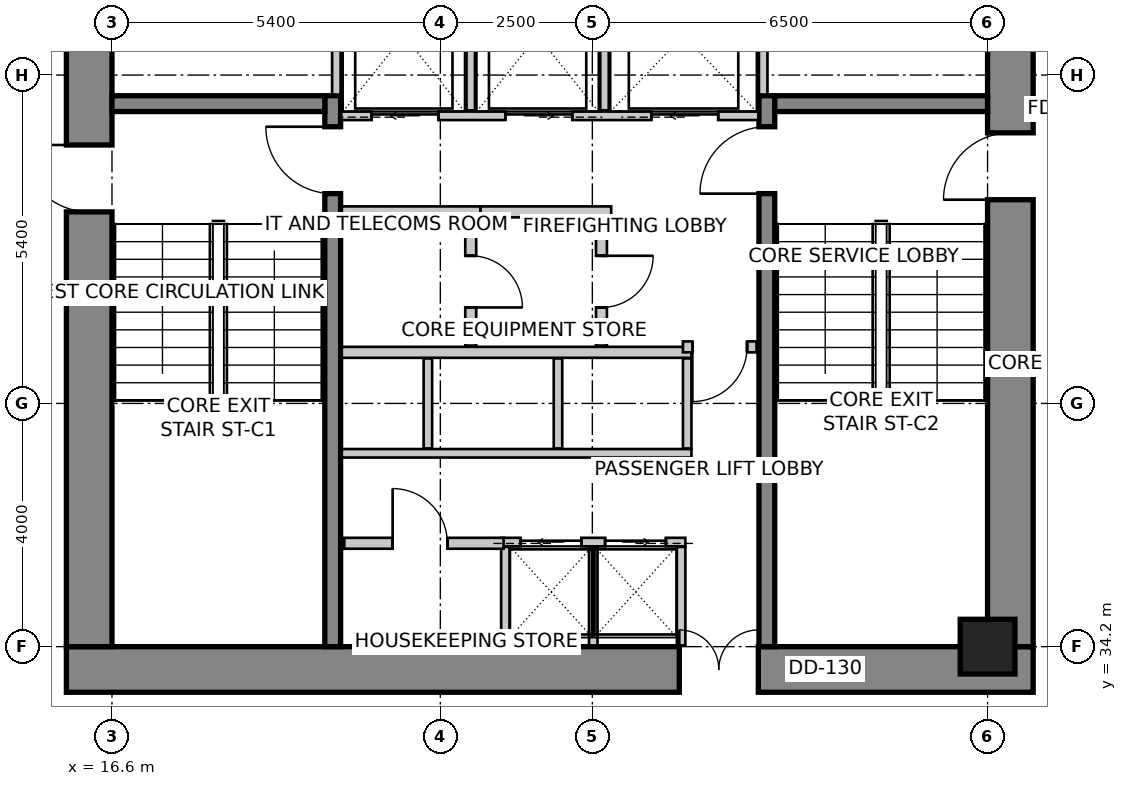
"""IFC4 building model, lengths in metres.
Left out: names, types, materials, properties, quantities, classifications, styles, units other than length and angle.
Written with IfcOpenShell. Run it as: python <this file> out.ifc"""

import sys

from ifc_helpers import new_model, si_unit, direction, frame, frame_2d, origin, origin_2d, place, context, subcontext, project, spatial, rectangle, extrude, source, transform, mapped, element, fill, save


model = new_model("IFC4")
c1 = context("Model", 3, precision=1e-05, world=origin(), true_north=direction((0.0, 1.0)))
c2 = subcontext(c1, "Body", "Model", "MODEL_VIEW")
j1 = project(units=[si_unit("LENGTHUNIT", "METRE"), si_unit("PLANEANGLEUNIT", "RADIAN")], contexts=[c1])
p1 = place(None, origin())
s1 = spatial("IfcSite", under=j1, at=p1, CompositionType="ELEMENT")
p2 = place(p1, origin())
s2 = spatial("IfcBuilding", under=s1, at=p2, CompositionType="ELEMENT")
p3 = place(p2, frame((0.0, 0.0, 146.6)))
s3 = spatial("IfcBuildingStorey", under=s2, at=p3, CompositionType="ELEMENT", Elevation=146.6)
p4 = place(p3, frame((15.85, 33.825, 0.0), z_axis=(0.0, 0.0, 1.0), x_axis=(1.0, 0.0, 0.0)))
e1 = element("IfcWall", 1, at=p4, inside=s3, PredefinedType="SHEAR", context=c2, shape_type="SweptSolid", body=[
    extrude(rectangle(XDim=15.9, YDim=0.75, at=frame_2d((7.95, 0.0))), origin(), (0.0, 0.0, 1.0), 3.6),
])
m1 = source(origin(), c2, "Body", "SweptSolid", [
    extrude(rectangle(XDim=1.3, YDim=2.15, at=frame_2d((0.65, 1.075))), frame((0.0, 0.385, 0.0), z_axis=(0.0, -1.0, 0.0), x_axis=(1.0, 0.0, 0.0)), (0.0, 0.0, 1.0), 0.77),
])
p5 = place(p4, frame((10.08, 0.0, 0.0)))
e2 = element("IfcOpeningElement", 2, at=p5, cuts=e1, PredefinedType="OPENING", context=c2, shape_type="MappedRepresentation", body=[
    mapped(m1, transform((0.0, 0.0, 0.0), scale=1.0)),
])
p6 = place(p3, frame((16.225, 34.2, 0.0), z_axis=(0.0, 0.0, 1.0), x_axis=(0.0, 1.0, 0.0)))
e3 = element("IfcWall", 3, at=p6, inside=s3, PredefinedType="SHEAR", context=c2, shape_type="SweptSolid", body=[
    extrude(rectangle(XDim=11.4, YDim=0.75, at=frame_2d((5.7, 0.0))), origin(), (0.0, 0.0, 1.0), 3.6),
])
m2 = source(origin(), c2, "Body", "SweptSolid", [
    extrude(rectangle(XDim=1.1, YDim=2.15, at=frame_2d((0.55, 1.075))), frame((0.0, 0.385, 0.0), z_axis=(0.0, -1.0, 0.0), x_axis=(1.0, 0.0, 0.0)), (0.0, 0.0, 1.0), 0.77),
])
p7 = place(p6, frame((7.15, 0.0, 0.0)))
e4 = element("IfcOpeningElement", 4, at=p7, cuts=e3, PredefinedType="OPENING", context=c2, shape_type="MappedRepresentation", body=[
    mapped(m2, transform((0.0, 0.0, 0.0), scale=1.0)),
])
p8 = place(p3, frame((31.375, 34.2, 0.0), z_axis=(0.0, 0.0, 1.0), x_axis=(0.0, 1.0, 0.0)))
e5 = element("IfcWall", 5, at=p8, inside=s3, PredefinedType="SHEAR", context=c2, shape_type="SweptSolid", body=[
    extrude(rectangle(XDim=11.4, YDim=0.75, at=frame_2d((5.7, 0.0))), origin(), (0.0, 0.0, 1.0), 3.6),
])
p9 = place(p8, frame((7.35, 0.0, 0.0)))
e6 = element("IfcOpeningElement", 6, at=p9, cuts=e5, PredefinedType="OPENING", context=c2, shape_type="MappedRepresentation", body=[
    mapped(m2, transform((0.0, 0.0, 0.0), scale=1.0)),
])
p10 = place(p3, frame((20.23, 34.2, 0.0), z_axis=(0.0, 0.0, 1.0), x_axis=(0.0, 1.0, 0.0)))
e7 = element("IfcWall", 7, at=p10, inside=s3, PredefinedType="SHEAR", context=c2, shape_type="SweptSolid", body=[
    extrude(rectangle(XDim=9.06, YDim=0.26, at=frame_2d((4.53, 0.0))), origin(), (0.0, 0.0, 1.0), 3.6),
])
m3 = source(origin(), c2, "Body", "SweptSolid", [
    extrude(rectangle(XDim=1.1, YDim=2.15, at=frame_2d((0.55, 1.075))), frame((0.0, 0.14, 0.0), z_axis=(0.0, -1.0, 0.0), x_axis=(1.0, 0.0, 0.0)), (0.0, 0.0, 1.0), 0.28),
])
p11 = place(p10, frame((7.45, 0.0, 0.0)))
e8 = element("IfcOpeningElement", 8, at=p11, cuts=e7, PredefinedType="OPENING", context=c2, shape_type="MappedRepresentation", body=[
    mapped(m3, transform((0.0, 0.0, 0.0), scale=1.0)),
])
p12 = place(p3, frame((27.37, 34.2, 0.0), z_axis=(0.0, 0.0, 1.0), x_axis=(0.0, 1.0, 0.0)))
e9 = element("IfcWall", 9, at=p12, inside=s3, PredefinedType="SHEAR", context=c2, shape_type="SweptSolid", body=[
    extrude(rectangle(XDim=9.06, YDim=0.26, at=frame_2d((4.53, 0.0))), origin(), (0.0, 0.0, 1.0), 3.6),
])
p13 = place(p12, frame((7.45, 0.0, 0.0)))
e10 = element("IfcOpeningElement", 10, at=p13, cuts=e9, PredefinedType="OPENING", context=c2, shape_type="MappedRepresentation", body=[
    mapped(m3, transform((0.0, 0.0, 0.0), scale=1.0)),
])
for number, where, z_axis, x_axis in (
    (11, (16.6, 43.13, 0.0), (0.0, 0.0, 1.0), (1.0, 0.0, 0.0)),
    (12, (27.5, 43.13, 0.0), (0.0, 0.0, 1.0), (1.0, 0.0, 0.0)),
):
    element("IfcWall", number, at=place(p3, frame(where, z_axis=z_axis, x_axis=x_axis)), inside=s3, PredefinedType="SHEAR", context=c2, shape_type="SweptSolid", body=[
        extrude(rectangle(XDim=3.5, YDim=0.26, at=frame_2d((1.75, 0.0))), origin(), (0.0, 0.0, 1.0), 3.6),
    ])
m4 = source(origin(), c2, "Body", "SweptSolid", [
    extrude(rectangle(XDim=0.9, YDim=0.9, at=origin_2d()), origin(), (0.0, 0.0, 1.0), 3.6),
])
p14 = place(p3, frame((31.0, 34.2, 0.0), z_axis=(0.0, 0.0, 1.0), x_axis=(1.0, 0.0, 0.0)))
e13 = element("IfcColumn", 13, at=p14, inside=s3, PredefinedType="COLUMN", context=c2, shape_type="MappedRepresentation", body=[
    mapped(m4, transform((0.0, 0.0, 0.0), scale=1.0)),
])
p15 = place(p3, frame((20.37, 42.93, 0.0), z_axis=(0.0, 0.0, 1.0), x_axis=(1.0, 0.0, 0.0)))
e14 = element("IfcWall", 14, at=p15, inside=s3, PredefinedType="SOLIDWALL", context=c2, shape_type="SweptSolid", body=[
    extrude(rectangle(XDim=6.86, YDim=0.14, at=frame_2d((3.43, 0.0))), origin(), (0.0, 0.0, 1.0), 3.35),
])
m5 = source(origin(), c2, "Body", "SweptSolid", [
    extrude(rectangle(XDim=1.1, YDim=2.15, at=frame_2d((0.55, 1.075))), frame((0.0, 0.08, 0.0), z_axis=(0.0, -1.0, 0.0), x_axis=(1.0, 0.0, 0.0)), (0.0, 0.0, 1.0), 0.16),
])
p16 = place(p15, frame((0.5, 0.0, 0.0)))
e15 = element("IfcOpeningElement", 15, at=p16, cuts=e14, PredefinedType="OPENING", context=c2, shape_type="MappedRepresentation", body=[
    mapped(m5, transform((0.0, 0.0, 0.0), scale=1.0)),
])
p17 = place(p15, frame((2.7, 0.0, 0.0)))
e16 = element("IfcOpeningElement", 16, at=p17, cuts=e14, PredefinedType="OPENING", context=c2, shape_type="MappedRepresentation", body=[
    mapped(m5, transform((0.0, 0.0, 0.0), scale=1.0)),
])
p18 = place(p15, frame((5.1, 0.0, 0.0)))
e17 = element("IfcOpeningElement", 17, at=p18, cuts=e14, PredefinedType="OPENING", context=c2, shape_type="MappedRepresentation", body=[
    mapped(m5, transform((0.0, 0.0, 0.0), scale=1.0)),
])
for number, where, z_axis, x_axis in (
    (18, (20.29, 43.28, 0.0), (0.0, 0.0, 1.0), (0.0, 1.0, 0.0)),
    (19, (27.31, 43.28, 0.0), (0.0, 0.0, 1.0), (0.0, 1.0, 0.0)),
):
    element("IfcWall", number, at=place(p3, frame(where, z_axis=z_axis, x_axis=x_axis)), inside=s3, PredefinedType="SOLIDWALL", context=c2, shape_type="SweptSolid", body=[
        extrude(rectangle(XDim=2.3, YDim=0.14, at=frame_2d((1.15, 0.0))), origin(), (0.0, 0.0, 1.0), 3.35),
    ])
for number, where, z_axis, x_axis in (
    (20, (22.5, 43.02, 0.0), (0.0, 0.0, 1.0), (0.0, 1.0, 0.0)),
    (21, (24.7, 43.02, 0.0), (0.0, 0.0, 1.0), (0.0, 1.0, 0.0)),
):
    element("IfcWall", number, at=place(p3, frame(where, z_axis=z_axis, x_axis=x_axis)), inside=s3, PredefinedType="SOLIDWALL", context=c2, shape_type="SweptSolid", body=[
        extrude(rectangle(XDim=2.56, YDim=0.14, at=frame_2d((1.28, 0.0))), origin(), (0.0, 0.0, 1.0), 3.35),
    ])
p19 = place(p3, frame((23.0, 35.92, 0.0), z_axis=(0.0, 0.0, 1.0), x_axis=(1.0, 0.0, 0.0)))
e22 = element("IfcWall", 22, at=p19, inside=s3, PredefinedType="SOLIDWALL", context=c2, shape_type="SweptSolid", body=[
    extrude(rectangle(XDim=3.03, YDim=0.14, at=frame_2d((1.515, 0.0))), origin(), (0.0, 0.0, 1.0), 3.35),
])
m6 = source(origin(), c2, "Body", "SweptSolid", [
    extrude(rectangle(XDim=1.0, YDim=2.15, at=frame_2d((0.5, 1.075))), frame((0.0, 0.08, 0.0), z_axis=(0.0, -1.0, 0.0), x_axis=(1.0, 0.0, 0.0)), (0.0, 0.0, 1.0), 0.16),
])
p20 = place(p19, frame((0.32, 0.0, 0.0)))
e23 = element("IfcOpeningElement", 23, at=p20, cuts=e22, PredefinedType="OPENING", context=c2, shape_type="MappedRepresentation", body=[
    mapped(m6, transform((0.0, 0.0, 0.0), scale=1.0)),
])
p21 = place(p19, frame((1.71, 0.0, 0.0)))
e24 = element("IfcOpeningElement", 24, at=p21, cuts=e22, PredefinedType="OPENING", context=c2, shape_type="MappedRepresentation", body=[
    mapped(m6, transform((0.0, 0.0, 0.0), scale=1.0)),
])
for number, where, z_axis, x_axis in (
    (25, (25.96, 34.22, 0.0), (0.0, 0.0, 1.0), (0.0, 1.0, 0.0)),
    (26, (23.07, 34.22, 0.0), (0.0, 0.0, 1.0), (0.0, 1.0, 0.0)),
    (27, (24.515, 34.22, 0.0), (0.0, 0.0, 1.0), (0.0, 1.0, 0.0)),
):
    element("IfcWall", number, at=place(p3, frame(where, z_axis=z_axis, x_axis=x_axis)), inside=s3, PredefinedType="SOLIDWALL", context=c2, shape_type="SweptSolid", body=[
        extrude(rectangle(XDim=1.62, YDim=0.14, at=frame_2d((0.81, 0.0))), origin(), (0.0, 0.0, 1.0), 2.642),
    ])
p22 = place(p3, frame((20.38, 37.38, 0.0), z_axis=(0.0, 0.0, 1.0), x_axis=(1.0, 0.0, 0.0)))
e28 = element("IfcWall", 28, at=p22, inside=s3, PredefinedType="SOLIDWALL", context=c2, shape_type="SweptSolid", body=[
    extrude(rectangle(XDim=5.75, YDim=0.14, at=frame_2d((2.875, 0.0))), origin(), (0.0, 0.0, 1.0), 3.35),
])
p23 = place(p3, frame((20.38, 39.04, 0.0), z_axis=(0.0, 0.0, 1.0), x_axis=(1.0, 0.0, 0.0)))
e29 = element("IfcWall", 29, at=p23, inside=s3, PredefinedType="SOLIDWALL", context=c2, shape_type="SweptSolid", body=[
    extrude(rectangle(XDim=5.75, YDim=0.18, at=frame_2d((2.875, 0.0))), origin(), (0.0, 0.0, 1.0), 3.35),
])
for number, where, z_axis, x_axis in (
    (30, (26.06, 37.46, 0.0), (0.0, 0.0, 1.0), (0.0, 1.0, 0.0)),
    (31, (21.795, 37.46, 0.0), (0.0, 0.0, 1.0), (0.0, 1.0, 0.0)),
    (32, (23.935, 37.46, 0.0), (0.0, 0.0, 1.0), (0.0, 1.0, 0.0)),
):
    element("IfcWall", number, at=place(p3, frame(where, z_axis=z_axis, x_axis=x_axis)), inside=s3, PredefinedType="SOLIDWALL", context=c2, shape_type="SweptSolid", body=[
        extrude(rectangle(XDim=1.48, YDim=0.14, at=frame_2d((0.74, 0.0))), origin(), (0.0, 0.0, 1.0), 3.35),
    ])
p24 = place(p3, frame((22.66, 41.35, 0.0), z_axis=(0.0, 0.0, 1.0), x_axis=(-1.0, 0.0, 0.0)))
e33 = element("IfcWall", 33, at=p24, inside=s3, PredefinedType="PARTITIONING", context=c2, shape_type="SweptSolid", body=[
    extrude(rectangle(XDim=2.28, YDim=0.18, at=frame_2d((1.14, 0.0))), origin(), (0.0, 0.0, 1.0), 3.35),
])
p25 = place(p3, frame((24.81, 41.35, 0.0), z_axis=(0.0, 0.0, 1.0), x_axis=(-1.0, 0.0, 0.0)))
e34 = element("IfcWall", 34, at=p25, inside=s3, PredefinedType="PARTITIONING", context=c2, shape_type="SweptSolid", body=[
    extrude(rectangle(XDim=2.148, YDim=0.18, at=frame_2d((1.074, 0.0))), origin(), (0.0, 0.0, 1.0), 3.35),
])
p26 = place(p3, frame((22.5, 41.256, 0.0), z_axis=(0.0, 0.0, 1.0), x_axis=(0.0, -1.0, 0.0)))
e35 = element("IfcWall", 35, at=p26, inside=s3, PredefinedType="PARTITIONING", context=c2, shape_type="SweptSolid", body=[
    extrude(rectangle(XDim=2.106, YDim=0.18, at=frame_2d((1.053, 0.0))), origin(), (0.0, 0.0, 1.0), 3.35),
])
m7 = source(origin(), c2, "Body", "SweptSolid", [
    extrude(rectangle(XDim=0.85, YDim=2.15, at=frame_2d((0.425, 1.075))), frame((0.0, 0.1, 0.0), z_axis=(0.0, -1.0, 0.0), x_axis=(1.0, 0.0, 0.0)), (0.0, 0.0, 1.0), 0.2),
])
p27 = place(p26, frame((0.628, 0.0, 0.0)))
e36 = element("IfcOpeningElement", 36, at=p27, cuts=e35, PredefinedType="OPENING", context=c2, shape_type="MappedRepresentation", body=[
    mapped(m7, transform((0.0, 0.0, 0.0), scale=1.0)),
])
p28 = place(p3, frame((24.65, 41.256, 0.0), z_axis=(0.0, 0.0, 1.0), x_axis=(0.0, -1.0, 0.0)))
e37 = element("IfcWall", 37, at=p28, inside=s3, PredefinedType="PARTITIONING", context=c2, shape_type="SweptSolid", body=[
    extrude(rectangle(XDim=2.106, YDim=0.18, at=frame_2d((1.053, 0.0))), origin(), (0.0, 0.0, 1.0), 3.35),
])
p29 = place(p28, frame((0.628, 0.0, 0.0)))
e38 = element("IfcOpeningElement", 38, at=p29, cuts=e37, PredefinedType="OPENING", context=c2, shape_type="MappedRepresentation", body=[
    mapped(m7, transform((0.0, 0.0, 0.0), scale=1.0)),
])
p30 = place(p3, frame((27.2, 39.13, 0.0), z_axis=(0.0, 0.0, 1.0), x_axis=(-1.0, 0.0, 0.0)))
e39 = element("IfcWall", 39, at=p30, inside=s3, PredefinedType="PARTITIONING", context=c2, shape_type="SweptSolid", body=[
    extrude(rectangle(XDim=1.21, YDim=0.18, at=frame_2d((0.605, 0.0))), origin(), (0.0, 0.0, 1.0), 3.35),
])
m8 = source(origin(), c2, "Body", "SweptSolid", [
    extrude(rectangle(XDim=0.9, YDim=2.15, at=frame_2d((0.45, 1.075))), frame((0.0, 0.1, 0.0), z_axis=(0.0, -1.0, 0.0), x_axis=(1.0, 0.0, 0.0)), (0.0, 0.0, 1.0), 0.2),
])
p31 = place(p30, frame((0.155, 0.0, 0.0)))
e40 = element("IfcOpeningElement", 40, at=p31, cuts=e39, PredefinedType="OPENING", context=c2, shape_type="MappedRepresentation", body=[
    mapped(m8, transform((0.0, 0.0, 0.0), scale=1.0)),
])
p32 = place(p3, frame((20.42, 35.9, 0.0), z_axis=(0.0, 0.0, 1.0), x_axis=(1.0, 0.0, 0.0)))
e41 = element("IfcWall", 41, at=p32, inside=s3, PredefinedType="PARTITIONING", context=c2, shape_type="SweptSolid", body=[
    extrude(rectangle(XDim=2.62, YDim=0.18, at=frame_2d((1.31, 0.0))), origin(), (0.0, 0.0, 1.0), 3.35),
])
p33 = place(p32, frame((0.796, 0.0, 0.0)))
e42 = element("IfcOpeningElement", 42, at=p33, cuts=e41, PredefinedType="OPENING", context=c2, shape_type="MappedRepresentation", body=[
    mapped(m8, transform((0.0, 0.0, 0.0), scale=1.0)),
])
m9 = source(origin(), c2, "Body", "SweptSolid", [
    extrude(rectangle(XDim=1.1, YDim=2.15, at=frame_2d((0.55, 1.075))), frame((0.0, 0.025, 0.0), z_axis=(0.0, -1.0, 0.0), x_axis=(1.0, 0.0, 0.0)), (0.0, 0.0, 1.0), 0.05),
])
p34 = place(p16, origin())
e43 = element("IfcDoor", 43, at=p34, inside=s3, OperationType="SLIDING_TO_LEFT", PredefinedType="DOOR", context=c2, shape_type="MappedRepresentation", body=[
    mapped(m9, transform((0.0, 0.0, 0.0), scale=1.0)),
])
fill(e15, e43)
p35 = place(p17, origin())
e44 = element("IfcDoor", 44, at=p35, inside=s3, OperationType="SLIDING_TO_RIGHT", PredefinedType="DOOR", context=c2, shape_type="MappedRepresentation", body=[
    mapped(m9, transform((0.0, 0.0, 0.0), scale=1.0)),
])
fill(e16, e44)
m10 = source(origin(), c2, "Body", "SweptSolid", [
    extrude(rectangle(XDim=1.1, YDim=2.15, at=frame_2d((0.55, 1.075))), frame((0.0, 0.025, 0.0), z_axis=(0.0, -1.0, 0.0), x_axis=(1.0, 0.0, 0.0)), (0.0, 0.0, 1.0), 0.05),
])
p36 = place(p18, origin())
e45 = element("IfcDoor", 45, at=p36, inside=s3, OperationType="SLIDING_TO_LEFT", PredefinedType="DOOR", context=c2, shape_type="MappedRepresentation", body=[
    mapped(m10, transform((0.0, 0.0, 0.0), scale=1.0)),
])
fill(e17, e45)
m11 = source(origin(), c2, "Body", "SweptSolid", [
    extrude(rectangle(XDim=1.0, YDim=2.15, at=frame_2d((0.5, 1.075))), frame((0.0, 0.025, 0.0), z_axis=(0.0, -1.0, 0.0), x_axis=(1.0, 0.0, 0.0)), (0.0, 0.0, 1.0), 0.05),
])
p37 = place(p20, origin())
e46 = element("IfcDoor", 46, at=p37, inside=s3, OperationType="SLIDING_TO_LEFT", PredefinedType="DOOR", context=c2, shape_type="MappedRepresentation", body=[
    mapped(m11, transform((0.0, 0.0, 0.0), scale=1.0)),
])
fill(e23, e46)
p38 = place(p21, origin())
e47 = element("IfcDoor", 47, at=p38, inside=s3, OperationType="SLIDING_TO_RIGHT", PredefinedType="DOOR", context=c2, shape_type="MappedRepresentation", body=[
    mapped(m11, transform((0.0, 0.0, 0.0), scale=1.0)),
])
fill(e24, e47)
m12 = source(origin(), c2, "Body", "SweptSolid", [
    extrude(rectangle(XDim=1.1, YDim=2.15, at=frame_2d((0.55, 1.075))), frame((0.0, 0.025, 0.0), z_axis=(0.0, -1.0, 0.0), x_axis=(1.0, 0.0, 0.0)), (0.0, 0.0, 1.0), 0.05),
])
p39 = place(p11, origin())
e48 = element("IfcDoor", 48, at=p39, inside=s3, OperationType="SINGLE_SWING_RIGHT", PredefinedType="DOOR", context=c2, shape_type="MappedRepresentation", body=[
    mapped(m12, transform((0.0, 0.0, 0.0), scale=1.0)),
])
fill(e8, e48)
p40 = place(p13, origin())
e49 = element("IfcDoor", 49, at=p40, inside=s3, OperationType="SINGLE_SWING_LEFT", PredefinedType="DOOR", context=c2, shape_type="MappedRepresentation", body=[
    mapped(m12, transform((0.0, 0.0, 0.0), scale=1.0)),
])
fill(e10, e49)
p41 = place(p7, origin())
e50 = element("IfcDoor", 50, at=p41, inside=s3, OperationType="SINGLE_SWING_RIGHT", PredefinedType="DOOR", context=c2, shape_type="MappedRepresentation", body=[
    mapped(m12, transform((0.0, 0.0, 0.0), scale=1.0)),
])
fill(e4, e50)
p42 = place(p9, origin())
e51 = element("IfcDoor", 51, at=p42, inside=s3, OperationType="SINGLE_SWING_LEFT", PredefinedType="DOOR", context=c2, shape_type="MappedRepresentation", body=[
    mapped(m12, transform((0.0, 0.0, 0.0), scale=1.0)),
])
fill(e6, e51)
m13 = source(origin(), c2, "Body", "SweptSolid", [
    extrude(rectangle(XDim=1.3, YDim=2.15, at=frame_2d((0.65, 1.075))), frame((0.0, 0.025, 0.0), z_axis=(0.0, -1.0, 0.0), x_axis=(1.0, 0.0, 0.0)), (0.0, 0.0, 1.0), 0.05),
])
p43 = place(p5, origin())
e52 = element("IfcDoor", 52, at=p43, inside=s3, OperationType="DOUBLE_DOOR_SINGLE_SWING", PredefinedType="DOOR", context=c2, shape_type="MappedRepresentation", body=[
    mapped(m13, transform((0.0, 0.0, 0.0), scale=1.0)),
])
fill(e2, e52)
m14 = source(origin(), c2, "Body", "SweptSolid", [
    extrude(rectangle(XDim=0.85, YDim=2.15, at=frame_2d((0.425, 1.075))), frame((0.0, 0.025, 0.0), z_axis=(0.0, -1.0, 0.0), x_axis=(1.0, 0.0, 0.0)), (0.0, 0.0, 1.0), 0.05),
])
p44 = place(p27, origin())
e53 = element("IfcDoor", 53, at=p44, inside=s3, OperationType="SINGLE_SWING_RIGHT", PredefinedType="DOOR", context=c2, shape_type="MappedRepresentation", body=[
    mapped(m14, transform((0.0, 0.0, 0.0), scale=1.0)),
])
fill(e36, e53)
p45 = place(p29, origin())
e54 = element("IfcDoor", 54, at=p45, inside=s3, OperationType="SINGLE_SWING_LEFT", PredefinedType="DOOR", context=c2, shape_type="MappedRepresentation", body=[
    mapped(m14, transform((0.0, 0.0, 0.0), scale=1.0)),
])
fill(e38, e54)
m15 = source(origin(), c2, "Body", "SweptSolid", [
    extrude(rectangle(XDim=0.9, YDim=2.15, at=frame_2d((0.45, 1.075))), frame((0.0, 0.025, 0.0), z_axis=(0.0, -1.0, 0.0), x_axis=(1.0, 0.0, 0.0)), (0.0, 0.0, 1.0), 0.05),
])
p46 = place(p31, origin())
e55 = element("IfcDoor", 55, at=p46, inside=s3, OperationType="SINGLE_SWING_RIGHT", PredefinedType="DOOR", context=c2, shape_type="MappedRepresentation", body=[
    mapped(m15, transform((0.0, 0.0, 0.0), scale=1.0)),
])
fill(e40, e55)
p47 = place(p33, origin())
e56 = element("IfcDoor", 56, at=p47, inside=s3, OperationType="SINGLE_SWING_LEFT", PredefinedType="DOOR", context=c2, shape_type="MappedRepresentation", body=[
    mapped(m15, transform((0.0, 0.0, 0.0), scale=1.0)),
])
fill(e42, e56)
save(model, sys.argv[1])
